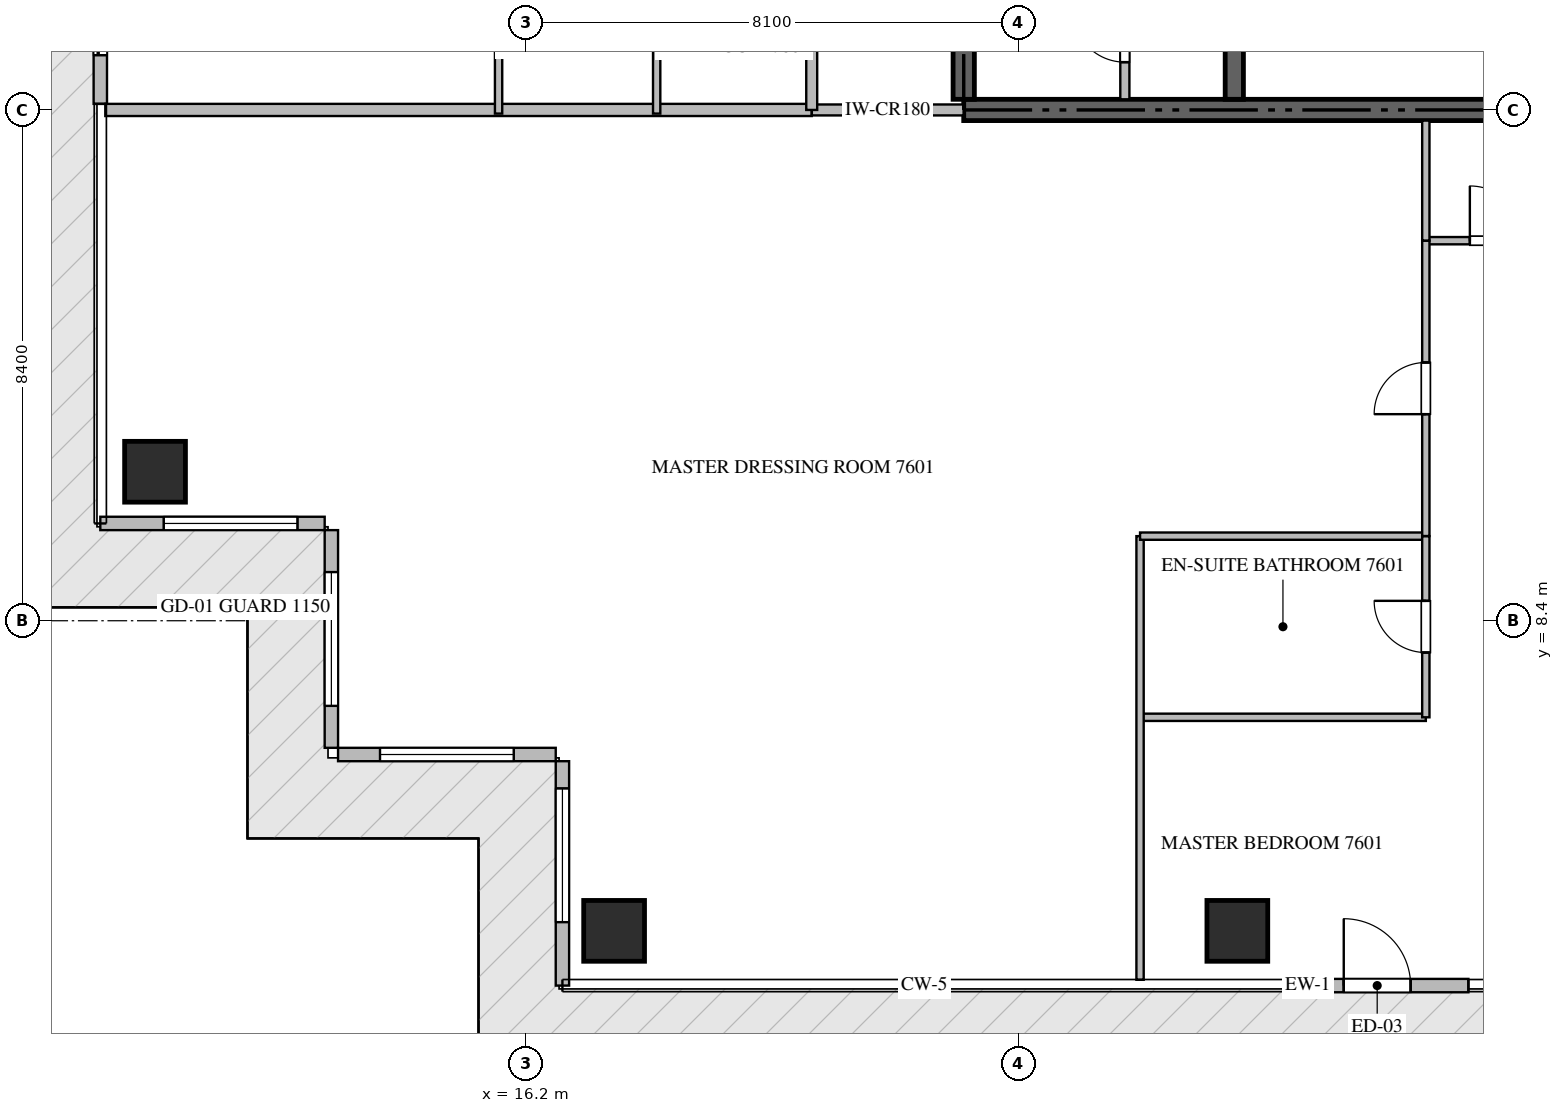
"""IFC4 building model, lengths in metres.
Left out: names, types, materials, properties, quantities, classifications, styles, units other than length and angle.
Written with IfcOpenShell. Run it as: python <this file> out.ifc"""

import sys

from ifc_helpers import new_model, si_unit, direction, frame, frame_2d, origin, origin_2d, place, context, subcontext, project, spatial, rectangle, extrude, source, transform, mapped, element, fill, save


model = new_model("IFC4")
c1 = context("Model", 3, precision=1e-05, world=origin(), true_north=direction((0.0, 1.0)))
c2 = subcontext(c1, "Body", "Model", "MODEL_VIEW")
j1 = project(units=[si_unit("LENGTHUNIT", "METRE"), si_unit("PLANEANGLEUNIT", "RADIAN")], contexts=[c1])
p1 = place(None, origin())
s1 = spatial("IfcSite", under=j1, at=p1, CompositionType="ELEMENT")
p2 = place(p1, origin())
s2 = spatial("IfcBuilding", under=s1, at=p2, CompositionType="ELEMENT")
p3 = place(p2, frame((0.0, 0.0, 305.6)))
s3 = spatial("IfcBuildingStorey", under=s2, at=p3, CompositionType="ELEMENT", Elevation=305.6)
p4 = place(p3, frame((23.4, 16.8, -0.26), z_axis=(0.0, 0.0, 1.0), x_axis=(1.0, 0.0, 0.0)))
e1 = element("IfcWall", 1, at=p4, inside=s3, PredefinedType="SHEAR", context=c2, shape_type="SweptSolid", body=[
    extrude(rectangle(XDim=18.0, YDim=0.35, at=frame_2d((9.0, 0.0))), origin(), (0.0, 0.0, 1.0), 4.048),
])
p5 = place(p3, frame((23.4, 16.975, -0.26), z_axis=(0.0, 0.0, 1.0), x_axis=(0.0, 1.0, 0.0)))
e2 = element("IfcWall", 2, at=p5, inside=s3, PredefinedType="SHEAR", context=c2, shape_type="SweptSolid", body=[
    extrude(rectangle(XDim=4.875, YDim=0.35, at=frame_2d((2.438, 0.0))), origin(), (0.0, 0.0, 1.0), 4.048),
])
p6 = place(p3, frame((27.85, 16.975, -0.26), z_axis=(0.0, 0.0, 1.0), x_axis=(0.0, 1.0, 0.0)))
e3 = element("IfcWall", 3, at=p6, inside=s3, PredefinedType="SHEAR", context=c2, shape_type="SweptSolid", body=[
    extrude(rectangle(XDim=4.875, YDim=0.3, at=frame_2d((2.438, 0.0))), origin(), (0.0, 0.0, 1.0), 4.048),
])
m1 = source(origin(), c2, "Body", "SweptSolid", [
    extrude(rectangle(XDim=1.0, YDim=1.0, at=origin_2d()), origin(), (0.0, 0.0, 1.0), 4.05),
])
for number, where, z_axis, x_axis in (
    (4, (17.65, 3.3, -0.26), (0.0, 0.0, 1.0), (1.0, 0.0, 0.0)),
    (5, (27.9, 3.3, -0.26), (0.0, 0.0, 1.0), (1.0, 0.0, 0.0)),
    (6, (10.1, 10.85, -0.26), (0.0, 0.0, 1.0), (1.0, 0.0, 0.0)),
):
    element("IfcColumn", number, at=place(p3, frame(where, z_axis=z_axis, x_axis=x_axis)), inside=s3, PredefinedType="COLUMN", context=c2, shape_type="MappedRepresentation", body=[
        mapped(m1, transform((0.0, 0.0, 0.0), scale=1.0)),
    ])
p7 = place(p3, frame((28.7, 2.4, 0.0), z_axis=(0.0, 0.0, 1.0), x_axis=(1.0, 0.0, 0.0)))
e7 = element("IfcWall", 7, at=p7, inside=s3, PredefinedType="ELEMENTEDWALL", context=c2, shape_type="SweptSolid", body=[
    extrude(rectangle(XDim=3.0, YDim=0.22, at=frame_2d((1.5, 0.0))), origin(), (0.0, 0.0, 1.0), 3.775),
])
p8 = place(p7, frame((0.95, 0.0, 0.0)))
e8 = element("IfcOpeningElement", 8, at=p8, cuts=e7, PredefinedType="OPENING", context=c2, shape_type="SweptSolid", body=[
    extrude(rectangle(XDim=1.1, YDim=2.2, at=frame_2d((0.55, 1.1))), frame((0.0, 0.12, 0.0), z_axis=(0.0, -1.0, 0.0), x_axis=(1.0, 0.0, 0.0)), (0.0, 0.0, 1.0), 0.24),
])
p9 = place(p3, frame((9.2, 19.9, 0.0), z_axis=(0.0, 0.0, 1.0), x_axis=(0.0, -1.0, 0.0)))
e9 = element("IfcWall", 9, at=p9, inside=s3, PredefinedType="ELEMENTEDWALL", context=c2, shape_type="SweptSolid", body=[
    extrude(rectangle(XDim=3.0, YDim=0.22, at=frame_2d((1.5, 0.0))), origin(), (0.0, 0.0, 1.0), 3.775),
])
p10 = place(p9, frame((0.8, 0.0, 0.0)))
e10 = element("IfcOpeningElement", 10, at=p10, cuts=e9, PredefinedType="OPENING", context=c2, shape_type="SweptSolid", body=[
    extrude(rectangle(XDim=1.4, YDim=2.25, at=frame_2d((0.7, 1.125))), frame((0.0, 0.12, 0.0), z_axis=(0.0, -1.0, 0.0), x_axis=(1.0, 0.0, 0.0)), (0.0, 0.0, 1.0), 0.24),
])
p11 = place(p3, frame((9.2, 10.0, 0.0), z_axis=(0.0, 0.0, 1.0), x_axis=(1.0, 0.0, 0.0)))
e11 = element("IfcWall", 11, at=p11, inside=s3, PredefinedType="ELEMENTEDWALL", context=c2, shape_type="SweptSolid", body=[
    extrude(rectangle(XDim=3.69, YDim=0.22, at=frame_2d((1.845, 0.0))), origin(), (0.0, 0.0, 1.0), 3.775),
])
p12 = place(p11, frame((1.043, 0.0, 0.65)))
e12 = element("IfcOpeningElement", 12, at=p12, cuts=e11, PredefinedType="OPENING", context=c2, shape_type="SweptSolid", body=[
    extrude(rectangle(XDim=2.2, YDim=2.4, at=frame_2d((1.1, 1.2))), frame((0.0, 0.12, 0.0), z_axis=(0.0, -1.0, 0.0), x_axis=(1.0, 0.0, 0.0)), (0.0, 0.0, 1.0), 0.24),
])
p13 = place(p3, frame((13.0, 9.89, 0.0), z_axis=(0.0, 0.0, 1.0), x_axis=(0.0, -1.0, 0.0)))
e13 = element("IfcWall", 13, at=p13, inside=s3, PredefinedType="ELEMENTEDWALL", context=c2, shape_type="SweptSolid", body=[
    extrude(rectangle(XDim=3.58, YDim=0.22, at=frame_2d((1.79, 0.0))), origin(), (0.0, 0.0, 1.0), 3.775),
])
p14 = place(p13, frame((0.69, 0.0, 0.65)))
e14 = element("IfcOpeningElement", 14, at=p14, cuts=e13, PredefinedType="OPENING", context=c2, shape_type="SweptSolid", body=[
    extrude(rectangle(XDim=2.2, YDim=2.4, at=frame_2d((1.1, 1.2))), frame((0.0, 0.12, 0.0), z_axis=(0.0, -1.0, 0.0), x_axis=(1.0, 0.0, 0.0)), (0.0, 0.0, 1.0), 0.24),
])
p15 = place(p3, frame((13.11, 6.2, 0.0), z_axis=(0.0, 0.0, 1.0), x_axis=(1.0, 0.0, 0.0)))
e15 = element("IfcWall", 15, at=p15, inside=s3, PredefinedType="ELEMENTEDWALL", context=c2, shape_type="SweptSolid", body=[
    extrude(rectangle(XDim=3.58, YDim=0.22, at=frame_2d((1.79, 0.0))), origin(), (0.0, 0.0, 1.0), 3.775),
])
p16 = place(p15, frame((0.69, 0.0, 0.65)))
e16 = element("IfcOpeningElement", 16, at=p16, cuts=e15, PredefinedType="OPENING", context=c2, shape_type="SweptSolid", body=[
    extrude(rectangle(XDim=2.2, YDim=2.4, at=frame_2d((1.1, 1.2))), frame((0.0, 0.12, 0.0), z_axis=(0.0, -1.0, 0.0), x_axis=(1.0, 0.0, 0.0)), (0.0, 0.0, 1.0), 0.24),
])
p17 = place(p3, frame((16.8, 6.09, 0.0), z_axis=(0.0, 0.0, 1.0), x_axis=(0.0, -1.0, 0.0)))
e17 = element("IfcWall", 17, at=p17, inside=s3, PredefinedType="ELEMENTEDWALL", context=c2, shape_type="SweptSolid", body=[
    extrude(rectangle(XDim=3.69, YDim=0.22, at=frame_2d((1.845, 0.0))), origin(), (0.0, 0.0, 1.0), 3.775),
])
p18 = place(p17, frame((0.447, 0.0, 0.65)))
e18 = element("IfcOpeningElement", 18, at=p18, cuts=e17, PredefinedType="OPENING", context=c2, shape_type="SweptSolid", body=[
    extrude(rectangle(XDim=2.2, YDim=2.4, at=frame_2d((1.1, 1.2))), frame((0.0, 0.12, 0.0), z_axis=(0.0, -1.0, 0.0), x_axis=(1.0, 0.0, 0.0)), (0.0, 0.0, 1.0), 0.24),
])
p19 = place(p3, frame((26.05, 16.975, 0.0), z_axis=(0.0, 0.0, 1.0), x_axis=(0.0, 1.0, 0.0)))
e19 = element("IfcWall", 19, at=p19, inside=s3, PredefinedType="PARTITIONING", context=c2, shape_type="SweptSolid", body=[
    extrude(rectangle(XDim=2.073, YDim=0.15, at=frame_2d((1.037, 0.0))), origin(), (0.0, 0.0, 1.0), 3.79),
])
p20 = place(p19, frame((0.611, 0.0, 0.0)))
e20 = element("IfcOpeningElement", 20, at=p20, cuts=e19, PredefinedType="OPENING", context=c2, shape_type="SweptSolid", body=[
    extrude(rectangle(XDim=0.85, YDim=2.1, at=frame_2d((0.425, 1.05))), frame((0.0, 0.085, 0.0), z_axis=(0.0, -1.0, 0.0), x_axis=(1.0, 0.0, 0.0)), (0.0, 0.0, 1.0), 0.17),
])
p21 = place(p3, frame((9.282, 16.8, 0.0), z_axis=(0.0, 0.0, 1.0), x_axis=(1.0, 0.0, 0.0)))
e21 = element("IfcWall", 21, at=p21, inside=s3, PredefinedType="PARTITIONING", context=c2, shape_type="SweptSolid", body=[
    extrude(rectangle(XDim=11.618, YDim=0.2, at=frame_2d((5.809, 0.0))), origin(), (0.0, 0.0, 1.0), 3.79),
])
p22 = place(p3, frame((20.902, 16.8, 0.0), z_axis=(0.0, 0.0, 1.0), x_axis=(1.0, 0.0, 0.0)))
e22 = element("IfcWall", 22, at=p22, inside=s3, PredefinedType="PARTITIONING", context=c2, shape_type="SweptSolid", body=[
    extrude(rectangle(XDim=2.496, YDim=0.18, at=frame_2d((1.248, 0.0))), origin(), (0.0, 0.0, 1.0), 3.79),
])
p23 = place(p3, frame((20.9, 16.8, 0.0), z_axis=(0.0, 0.0, 1.0), x_axis=(0.0, 1.0, 0.0)))
e23 = element("IfcWall", 23, at=p23, inside=s3, PredefinedType="PARTITIONING", context=c2, shape_type="SweptSolid", body=[
    extrude(rectangle(XDim=16.8, YDim=0.18, at=frame_2d((8.4, 0.0))), origin(), (0.0, 0.0, 1.0), 3.79),
])
p24 = place(p23, frame((4.803, 0.0, 0.0)))
e24 = element("IfcOpeningElement", 24, at=p24, cuts=e23, PredefinedType="OPENING", context=c2, shape_type="SweptSolid", body=[
    extrude(rectangle(XDim=1.0, YDim=2.15, at=frame_2d((0.5, 1.075))), frame((0.0, 0.1, 0.0), z_axis=(0.0, -1.0, 0.0), x_axis=(1.0, 0.0, 0.0)), (0.0, 0.0, 1.0), 0.2),
])
p25 = place(p23, frame((13.225, 0.0, 0.0)))
e25 = element("IfcOpeningElement", 25, at=p25, cuts=e23, PredefinedType="OPENING", context=c2, shape_type="SweptSolid", body=[
    extrude(rectangle(XDim=1.0, YDim=2.15, at=frame_2d((0.5, 1.075))), frame((0.0, 0.1, 0.0), z_axis=(0.0, -1.0, 0.0), x_axis=(1.0, 0.0, 0.0)), (0.0, 0.0, 1.0), 0.2),
])
p26 = place(p3, frame((31.0, 14.65, 0.0), z_axis=(0.0, 0.0, 1.0), x_axis=(1.0, 0.0, 0.0)))
e26 = element("IfcWall", 26, at=p26, inside=s3, PredefinedType="PARTITIONING", context=c2, shape_type="SweptSolid", body=[
    extrude(rectangle(XDim=2.348, YDim=0.12, at=frame_2d((1.174, 0.0))), origin(), (0.0, 0.0, 1.0), 3.79),
])
p27 = place(p26, frame((0.724, 0.0, 0.0)))
e27 = element("IfcOpeningElement", 27, at=p27, cuts=e26, PredefinedType="OPENING", context=c2, shape_type="SweptSolid", body=[
    extrude(rectangle(XDim=0.9, YDim=2.1, at=frame_2d((0.45, 1.05))), frame((0.0, 0.07, 0.0), z_axis=(0.0, -1.0, 0.0), x_axis=(1.0, 0.0, 0.0)), (0.0, 0.0, 1.0), 0.14),
])
p28 = place(p3, frame((26.3, 6.812, 0.0), z_axis=(0.0, 0.0, 1.0), x_axis=(1.0, 0.0, 0.0)))
e28 = element("IfcWall", 28, at=p28, inside=s3, PredefinedType="PARTITIONING", context=c2, shape_type="SweptSolid", body=[
    extrude(rectangle(XDim=4.7, YDim=0.12, at=frame_2d((2.35, 0.0))), origin(), (0.0, 0.0, 1.0), 3.79),
])
p29 = place(p3, frame((26.3, 2.495, 0.0), z_axis=(0.0, 0.0, 1.0), x_axis=(0.0, 1.0, 0.0)))
e29 = element("IfcWall", 29, at=p29, inside=s3, PredefinedType="PARTITIONING", context=c2, shape_type="SweptSolid", body=[
    extrude(rectangle(XDim=7.296, YDim=0.12, at=frame_2d((3.648, 0.0))), origin(), (0.0, 0.0, 1.0), 3.79),
])
p30 = place(p3, frame((26.3, 9.791, 0.0), z_axis=(0.0, 0.0, 1.0), x_axis=(1.0, 0.0, 0.0)))
e30 = element("IfcWall", 30, at=p30, inside=s3, PredefinedType="PARTITIONING", context=c2, shape_type="SweptSolid", body=[
    extrude(rectangle(XDim=4.7, YDim=0.12, at=frame_2d((2.35, 0.0))), origin(), (0.0, 0.0, 1.0), 3.79),
])
p31 = place(p3, frame((31.0, 6.812, 0.0), z_axis=(0.0, 0.0, 1.0), x_axis=(0.0, 1.0, 0.0)))
e31 = element("IfcWall", 31, at=p31, inside=s3, PredefinedType="PARTITIONING", context=c2, shape_type="SweptSolid", body=[
    extrude(rectangle(XDim=2.979, YDim=0.12, at=frame_2d((1.49, 0.0))), origin(), (0.0, 0.0, 1.0), 3.79),
])
p32 = place(p31, frame((1.065, 0.0, 0.0)))
e32 = element("IfcOpeningElement", 32, at=p32, cuts=e31, PredefinedType="OPENING", context=c2, shape_type="SweptSolid", body=[
    extrude(rectangle(XDim=0.85, YDim=2.1, at=frame_2d((0.425, 1.05))), frame((0.0, 0.07, 0.0), z_axis=(0.0, -1.0, 0.0), x_axis=(1.0, 0.0, 0.0)), (0.0, 0.0, 1.0), 0.14),
])
p33 = place(p3, frame((31.0, 9.793, 0.0), z_axis=(0.0, 0.0, 1.0), x_axis=(0.0, 1.0, 0.0)))
e33 = element("IfcWall", 33, at=p33, inside=s3, PredefinedType="PARTITIONING", context=c2, shape_type="SweptSolid", body=[
    extrude(rectangle(XDim=4.857, YDim=0.12, at=frame_2d((2.428, 0.0))), origin(), (0.0, 0.0, 1.0), 3.79),
])
p34 = place(p33, frame((2.004, 0.0, 0.0)))
e34 = element("IfcOpeningElement", 34, at=p34, cuts=e33, PredefinedType="OPENING", context=c2, shape_type="SweptSolid", body=[
    extrude(rectangle(XDim=0.85, YDim=2.1, at=frame_2d((0.425, 1.05))), frame((0.0, 0.07, 0.0), z_axis=(0.0, -1.0, 0.0), x_axis=(1.0, 0.0, 0.0)), (0.0, 0.0, 1.0), 0.14),
])
p35 = place(p3, frame((31.0, 14.652, 0.0), z_axis=(0.0, 0.0, 1.0), x_axis=(0.0, 1.0, 0.0)))
e35 = element("IfcWall", 35, at=p35, inside=s3, PredefinedType="PARTITIONING", context=c2, shape_type="SweptSolid", body=[
    extrude(rectangle(XDim=1.973, YDim=0.12, at=frame_2d((0.986, 0.0))), origin(), (0.0, 0.0, 1.0), 3.79),
])
for number, where, z_axis, x_axis in (
    (36, (18.35, 16.74, 0.0), (0.0, 0.0, 1.0), (0.0, 1.0, 0.0)),
    (37, (15.75, 16.74, 0.0), (0.0, 0.0, 1.0), (0.0, 1.0, 0.0)),
):
    element("IfcWall", number, at=place(p3, frame(where, z_axis=z_axis, x_axis=x_axis)), inside=s3, PredefinedType="PARTITIONING", context=c2, shape_type="SweptSolid", body=[
        extrude(rectangle(XDim=2.66, YDim=0.12, at=frame_2d((1.33, 0.0))), origin(), (0.0, 0.0, 1.0), 3.79),
    ])
m2 = source(origin(), c2, "Body", "SweptSolid", [
    extrude(rectangle(XDim=1.1, YDim=2.2, at=frame_2d((0.55, 1.1))), frame((0.0, 0.025, 0.0), z_axis=(0.0, -1.0, 0.0), x_axis=(1.0, 0.0, 0.0)), (0.0, 0.0, 1.0), 0.05),
])
p36 = place(p8, origin())
e38 = element("IfcDoor", 38, at=p36, inside=s3, OperationType="SINGLE_SWING_LEFT", PredefinedType="DOOR", context=c2, shape_type="MappedRepresentation", body=[
    mapped(m2, transform((0.0, 0.0, 0.0), scale=1.0)),
])
fill(e8, e38)
m3 = source(origin(), c2, "Body", "SweptSolid", [
    extrude(rectangle(XDim=1.4, YDim=2.25, at=frame_2d((0.7, 1.125))), frame((0.0, 0.025, 0.0), z_axis=(0.0, -1.0, 0.0), x_axis=(1.0, 0.0, 0.0)), (0.0, 0.0, 1.0), 0.05),
])
p37 = place(p10, origin())
e39 = element("IfcDoor", 39, at=p37, inside=s3, OperationType="SLIDING_TO_LEFT", PredefinedType="DOOR", context=c2, shape_type="MappedRepresentation", body=[
    mapped(m3, transform((0.0, 0.0, 0.0), scale=1.0)),
])
fill(e10, e39)
m4 = source(origin(), c2, "Body", "SweptSolid", [
    extrude(rectangle(XDim=2.2, YDim=2.4, at=frame_2d((1.1, 1.2))), frame((0.0, 0.03, 0.0), z_axis=(0.0, -1.0, 0.0), x_axis=(1.0, 0.0, 0.0)), (0.0, 0.0, 1.0), 0.06),
])
p38 = place(p12, origin())
e40 = element("IfcWindow", 40, at=p38, inside=s3, PartitioningType="SINGLE_PANEL", PredefinedType="WINDOW", context=c2, shape_type="MappedRepresentation", body=[
    mapped(m4, transform((0.0, 0.0, 0.0), scale=1.0)),
])
fill(e12, e40)
p39 = place(p14, origin())
e41 = element("IfcWindow", 41, at=p39, inside=s3, PartitioningType="SINGLE_PANEL", PredefinedType="WINDOW", context=c2, shape_type="MappedRepresentation", body=[
    mapped(m4, transform((0.0, 0.0, 0.0), scale=1.0)),
])
fill(e14, e41)
p40 = place(p16, origin())
e42 = element("IfcWindow", 42, at=p40, inside=s3, PartitioningType="SINGLE_PANEL", PredefinedType="WINDOW", context=c2, shape_type="MappedRepresentation", body=[
    mapped(m4, transform((0.0, 0.0, 0.0), scale=1.0)),
])
fill(e16, e42)
p41 = place(p18, origin())
e43 = element("IfcWindow", 43, at=p41, inside=s3, PartitioningType="SINGLE_PANEL", PredefinedType="WINDOW", context=c2, shape_type="MappedRepresentation", body=[
    mapped(m4, transform((0.0, 0.0, 0.0), scale=1.0)),
])
fill(e18, e43)
m5 = source(origin(), c2, "Body", "SweptSolid", [
    extrude(rectangle(XDim=0.85, YDim=2.1, at=frame_2d((0.425, 1.05))), frame((0.0, 0.025, 0.0), z_axis=(0.0, -1.0, 0.0), x_axis=(1.0, 0.0, 0.0)), (0.0, 0.0, 1.0), 0.05),
])
p42 = place(p20, origin())
e44 = element("IfcDoor", 44, at=p42, inside=s3, OperationType="SINGLE_SWING_RIGHT", PredefinedType="DOOR", context=c2, shape_type="MappedRepresentation", body=[
    mapped(m5, transform((0.0, 0.0, 0.0), scale=1.0)),
])
fill(e20, e44)
m6 = source(origin(), c2, "Body", "SweptSolid", [
    extrude(rectangle(XDim=0.9, YDim=2.1, at=frame_2d((0.45, 1.05))), frame((0.0, 0.025, 0.0), z_axis=(0.0, -1.0, 0.0), x_axis=(1.0, 0.0, 0.0)), (0.0, 0.0, 1.0), 0.05),
])
p43 = place(p27, origin())
e45 = element("IfcDoor", 45, at=p43, inside=s3, OperationType="SINGLE_SWING_LEFT", PredefinedType="DOOR", context=c2, shape_type="MappedRepresentation", body=[
    mapped(m6, transform((0.0, 0.0, 0.0), scale=1.0)),
])
fill(e27, e45)
p44 = place(p32, origin())
e46 = element("IfcDoor", 46, at=p44, inside=s3, OperationType="SINGLE_SWING_RIGHT", PredefinedType="DOOR", context=c2, shape_type="MappedRepresentation", body=[
    mapped(m5, transform((0.0, 0.0, 0.0), scale=1.0)),
])
fill(e32, e46)
p45 = place(p34, origin())
e47 = element("IfcDoor", 47, at=p45, inside=s3, OperationType="SINGLE_SWING_LEFT", PredefinedType="DOOR", context=c2, shape_type="MappedRepresentation", body=[
    mapped(m5, transform((0.0, 0.0, 0.0), scale=1.0)),
])
fill(e34, e47)
save(model, sys.argv[1])
